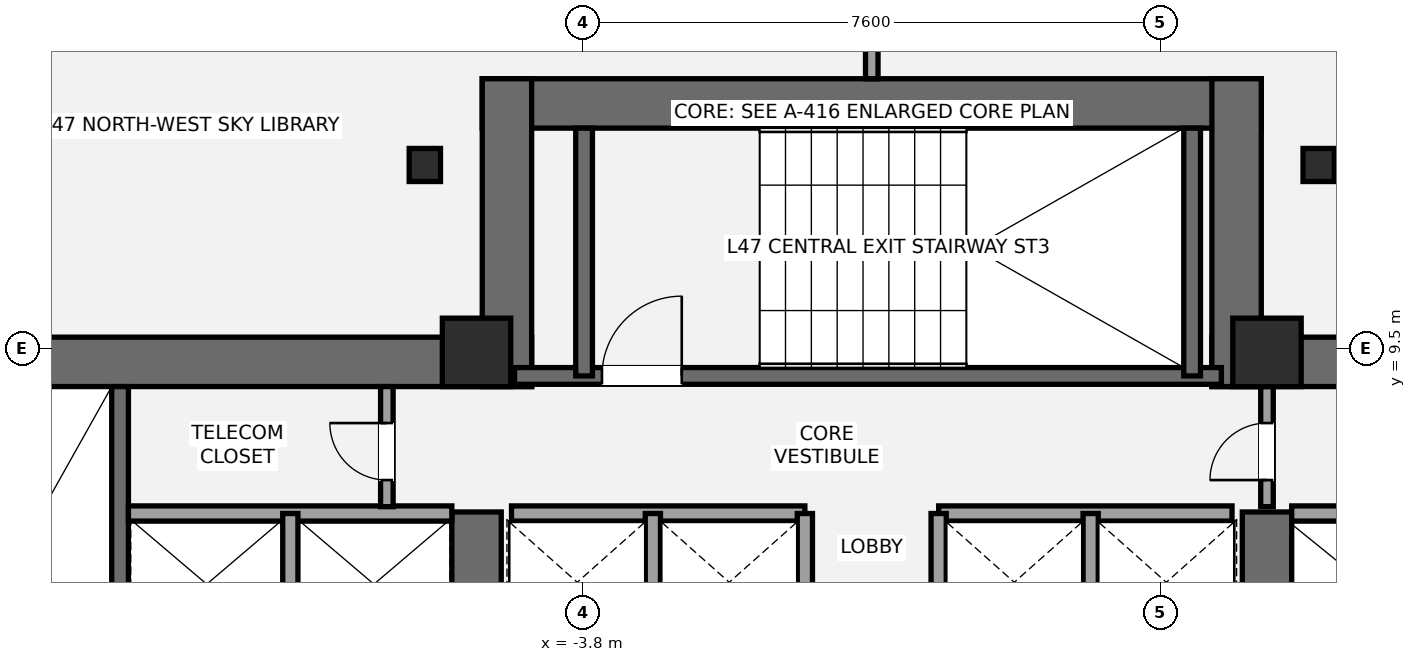
"""IFC4 building model, lengths in metres.
Left out: names, types, materials, properties, quantities, classifications, styles, units other than length and angle.
Written with IfcOpenShell. Run it as: python <this file> out.ifc"""

import sys

from ifc_helpers import new_model, si_unit, direction, frame, frame_2d, origin, origin_2d, place, context, subcontext, project, spatial, rectangle, i_section, extrude, element, fill, save


model = new_model("IFC4")
c1 = context("Model", 3, precision=1e-05, world=origin(), true_north=direction((0.0, 1.0)))
c2 = subcontext(c1, "Body", "Model", "MODEL_VIEW")
j1 = project(units=[si_unit("LENGTHUNIT", "METRE"), si_unit("PLANEANGLEUNIT", "RADIAN")], contexts=[c1])
p1 = place(None, origin())
s1 = spatial("IfcSite", under=j1, at=p1, CompositionType="ELEMENT")
p2 = place(p1, origin())
s2 = spatial("IfcBuilding", under=s1, at=p2, CompositionType="ELEMENT")
p3 = place(p2, frame((0.0, 0.0, 172.6)))
s3 = spatial("IfcBuildingStorey", under=s2, at=p3, CompositionType="ELEMENT", Elevation=172.6)
p4 = place(p3, frame((-13.8, 9.325, 0.0), z_axis=(0.0, 0.0, 1.0), x_axis=(1.0, 0.0, 0.0)))
e1 = element("IfcWall", 1, at=p4, inside=s3, PredefinedType="SHEAR", context=c2, shape_type="SweptSolid", body=[
    extrude(rectangle(XDim=9.325, YDim=0.65, at=frame_2d((4.663, 0.0))), origin(), (0.0, 0.0, 1.0), 3.2),
])
p5 = place(p3, frame((-5.2, 5.35, 0.0), z_axis=(0.0, 0.0, 1.0), x_axis=(0.0, 1.0, 0.0)))
e2 = element("IfcWall", 2, at=p5, inside=s3, PredefinedType="SHEAR", context=c2, shape_type="SweptSolid", body=[
    extrude(rectangle(XDim=2.0, YDim=0.65, at=frame_2d((1.0, 0.0))), origin(), (0.0, 0.0, 1.0), 3.2),
])
p6 = place(p3, frame((-9.89, 1.85, 0.0), z_axis=(0.0, 0.0, 1.0), x_axis=(0.0, 1.0, 0.0)))
e3 = element("IfcWall", 3, at=p6, inside=s3, PredefinedType="SHEAR", context=c2, shape_type="SweptSolid", body=[
    extrude(rectangle(XDim=7.15, YDim=0.22, at=frame_2d((3.575, 0.0))), origin(), (0.0, 0.0, 1.0), 3.2),
])
p7 = place(p3, frame((4.475, 9.325, 0.0), z_axis=(0.0, 0.0, 1.0), x_axis=(1.0, 0.0, 0.0)))
e4 = element("IfcWall", 4, at=p7, inside=s3, PredefinedType="SHEAR", context=c2, shape_type="SweptSolid", body=[
    extrude(rectangle(XDim=9.325, YDim=0.65, at=frame_2d((4.663, 0.0))), origin(), (0.0, 0.0, 1.0), 3.2),
])
p8 = place(p3, frame((5.2, 5.35, 0.0), z_axis=(0.0, 0.0, 1.0), x_axis=(0.0, 1.0, 0.0)))
e5 = element("IfcWall", 5, at=p8, inside=s3, PredefinedType="SHEAR", context=c2, shape_type="SweptSolid", body=[
    extrude(rectangle(XDim=2.0, YDim=0.65, at=frame_2d((1.0, 0.0))), origin(), (0.0, 0.0, 1.0), 3.2),
])
p9 = place(p3, frame((-5.125, 12.725, 0.0), z_axis=(0.0, 0.0, 1.0), x_axis=(1.0, 0.0, 0.0)))
e6 = element("IfcWall", 6, at=p9, inside=s3, PredefinedType="SHEAR", context=c2, shape_type="SweptSolid", body=[
    extrude(rectangle(XDim=10.25, YDim=0.65, at=frame_2d((5.125, 0.0))), origin(), (0.0, 0.0, 1.0), 3.2),
])
for number, where, z_axis, x_axis in (
    (7, (-4.8, 9.0, 0.0), (0.0, 0.0, 1.0), (0.0, 1.0, 0.0)),
    (8, (4.8, 9.0, 0.0), (0.0, 0.0, 1.0), (0.0, 1.0, 0.0)),
):
    element("IfcWall", number, at=place(p3, frame(where, z_axis=z_axis, x_axis=x_axis)), inside=s3, PredefinedType="SHEAR", context=c2, shape_type="SweptSolid", body=[
        extrude(rectangle(XDim=4.05, YDim=0.65, at=frame_2d((2.025, 0.0))), origin(), (0.0, 0.0, 1.0), 3.2),
    ])
p10 = place(p3, frame((-4.7, 9.14, 0.0), z_axis=(0.0, 0.0, 1.0), x_axis=(1.0, 0.0, 0.0)))
e9 = element("IfcWall", 9, at=p10, inside=s3, PredefinedType="SHEAR", context=c2, shape_type="SweptSolid", body=[
    extrude(rectangle(XDim=9.3, YDim=0.22, at=frame_2d((4.65, 0.0))), origin(), (0.0, 0.0, 1.0), 3.2),
])
p11 = place(p10, frame((1.15, 0.0, 0.0)))
e10 = element("IfcOpeningElement", 10, at=p11, cuts=e9, PredefinedType="OPENING", context=c2, shape_type="SweptSolid", body=[
    extrude(rectangle(XDim=1.05, YDim=2.15, at=frame_2d((0.525, 1.075))), frame((0.0, 0.12, 0.0), z_axis=(0.0, -1.0, 0.0), x_axis=(1.0, 0.0, 0.0)), (0.0, 0.0, 1.0), 0.24),
])
for number, where, z_axis, x_axis in (
    (11, (-3.785, 9.14, 0.0), (0.0, 0.0, 1.0), (0.0, 1.0, 0.0)),
    (12, (4.215, 9.14, 0.0), (0.0, 0.0, 1.0), (0.0, 1.0, 0.0)),
):
    element("IfcWall", number, at=place(p3, frame(where, z_axis=z_axis, x_axis=x_axis)), inside=s3, PredefinedType="SHEAR", context=c2, shape_type="SweptSolid", body=[
        extrude(rectangle(XDim=3.26, YDim=0.22, at=frame_2d((1.63, 0.0))), origin(), (0.0, 0.0, 1.0), 3.2),
    ])
for number, where, z_axis, x_axis in (
    (13, (-5.2, 9.45, 0.0), (0.0, 0.0, 1.0), (1.0, 0.0, 0.0)),
    (14, (5.2, 9.45, 0.0), (0.0, 0.0, 1.0), (1.0, 0.0, 0.0)),
):
    element("IfcColumn", number, at=place(p3, frame(where, z_axis=z_axis, x_axis=x_axis)), inside=s3, PredefinedType="COLUMN", context=c2, shape_type="SweptSolid", body=[
        extrude(rectangle(XDim=0.9, YDim=0.9, at=origin_2d()), origin(), (0.0, 0.0, 1.0), 3.2),
    ])
for number, where, z_axis, x_axis in (
    (15, (5.88, 11.915, 0.0), (0.0, 0.0, 1.0), (1.0, 0.0, 0.0)),
    (16, (-5.88, 11.915, 0.0), (0.0, 0.0, 1.0), (1.0, 0.0, 0.0)),
):
    element("IfcColumn", number, at=place(p3, frame(where, z_axis=z_axis, x_axis=x_axis)), inside=s3, PredefinedType="COLUMN", context=c2, shape_type="SweptSolid", body=[
        extrude(i_section(OverallWidth=0.412, OverallDepth=0.435, WebThickness=0.036, FlangeThickness=0.057, at=origin_2d()), origin(), (0.0, 0.0, 1.0), 3.2),
    ])
p12 = place(p3, frame((-9.78, 7.33, 0.0), z_axis=(0.0, 0.0, 1.0), x_axis=(1.0, 0.0, 0.0)))
e17 = element("IfcWall", 17, at=p12, inside=s3, PredefinedType="SOLIDWALL", context=c2, shape_type="SweptSolid", body=[
    extrude(rectangle(XDim=4.255, YDim=0.2, at=frame_2d((2.127, 0.0))), origin(), (0.0, 0.0, 1.0), 3.02),
])
p13 = place(p3, frame((-7.65, 5.47, 0.0), z_axis=(0.0, 0.0, 1.0), x_axis=(0.0, 1.0, 0.0)))
e18 = element("IfcWall", 18, at=p13, inside=s3, PredefinedType="SOLIDWALL", context=c2, shape_type="SweptSolid", body=[
    extrude(rectangle(XDim=1.86, YDim=0.2, at=frame_2d((0.93, 0.0))), origin(), (0.0, 0.0, 1.0), 3.02),
])
p14 = place(p3, frame((5.525, 7.33, 0.0), z_axis=(0.0, 0.0, 1.0), x_axis=(1.0, 0.0, 0.0)))
e19 = element("IfcWall", 19, at=p14, inside=s3, PredefinedType="SOLIDWALL", context=c2, shape_type="SweptSolid", body=[
    extrude(rectangle(XDim=4.255, YDim=0.2, at=frame_2d((2.127, 0.0))), origin(), (0.0, 0.0, 1.0), 3.02),
])
for number, where, z_axis, x_axis in (
    (20, (-4.74, 7.33, 0.0), (0.0, 0.0, 1.0), (1.0, 0.0, 0.0)),
    (21, (0.88, 7.33, 0.0), (0.0, 0.0, 1.0), (1.0, 0.0, 0.0)),
):
    element("IfcWall", number, at=place(p3, frame(where, z_axis=z_axis, x_axis=x_axis)), inside=s3, PredefinedType="SOLIDWALL", context=c2, shape_type="SweptSolid", body=[
        extrude(rectangle(XDim=3.86, YDim=0.2, at=frame_2d((1.93, 0.0))), origin(), (0.0, 0.0, 1.0), 3.02),
    ])
for number, where, z_axis, x_axis in (
    (22, (-2.88, 5.52, 0.0), (0.0, 0.0, 1.0), (0.0, 1.0, 0.0)),
    (23, (2.88, 5.52, 0.0), (0.0, 0.0, 1.0), (0.0, 1.0, 0.0)),
    (24, (-0.88, 5.52, 0.0), (0.0, 0.0, 1.0), (0.0, 1.0, 0.0)),
    (25, (0.88, 5.52, 0.0), (0.0, 0.0, 1.0), (0.0, 1.0, 0.0)),
):
    element("IfcWall", number, at=place(p3, frame(where, z_axis=z_axis, x_axis=x_axis)), inside=s3, PredefinedType="SOLIDWALL", context=c2, shape_type="SweptSolid", body=[
        extrude(rectangle(XDim=1.81, YDim=0.2, at=frame_2d((0.905, 0.0))), origin(), (0.0, 0.0, 1.0), 3.02),
    ])
p15 = place(p3, frame((-6.38, 7.42, 0.0), z_axis=(0.0, 0.0, 1.0), x_axis=(0.0, 1.0, 0.0)))
e26 = element("IfcWall", 26, at=p15, inside=s3, PredefinedType="PARTITIONING", context=c2, shape_type="SweptSolid", body=[
    extrude(rectangle(XDim=1.58, YDim=0.165, at=frame_2d((0.79, 0.0))), origin(), (0.0, 0.0, 1.0), 3.02),
])
p16 = place(p15, frame((0.35, 0.0, 0.0)))
e27 = element("IfcOpeningElement", 27, at=p16, cuts=e26, PredefinedType="OPENING", context=c2, shape_type="SweptSolid", body=[
    extrude(rectangle(XDim=0.75, YDim=2.1, at=frame_2d((0.375, 1.05))), frame((0.0, 0.093, 0.0), z_axis=(0.0, -1.0, 0.0), x_axis=(1.0, 0.0, 0.0)), (0.0, 0.0, 1.0), 0.185),
])
p17 = place(p3, frame((5.2, 7.42, 0.0), z_axis=(0.0, 0.0, 1.0), x_axis=(0.0, 1.0, 0.0)))
e28 = element("IfcWall", 28, at=p17, inside=s3, PredefinedType="PARTITIONING", context=c2, shape_type="SweptSolid", body=[
    extrude(rectangle(XDim=1.58, YDim=0.165, at=frame_2d((0.79, 0.0))), origin(), (0.0, 0.0, 1.0), 3.02),
])
p18 = place(p17, frame((0.35, 0.0, 0.0)))
e29 = element("IfcOpeningElement", 29, at=p18, cuts=e28, PredefinedType="OPENING", context=c2, shape_type="SweptSolid", body=[
    extrude(rectangle(XDim=0.75, YDim=2.1, at=frame_2d((0.375, 1.05))), frame((0.0, 0.093, 0.0), z_axis=(0.0, -1.0, 0.0), x_axis=(1.0, 0.0, 0.0)), (0.0, 0.0, 1.0), 0.185),
])
p19 = place(p3, frame((0.0, 13.05, 0.0), z_axis=(0.0, 0.0, 1.0), x_axis=(0.0, 1.0, 0.0)))
e30 = element("IfcWall", 30, at=p19, inside=s3, PredefinedType="PARTITIONING", context=c2, shape_type="SweptSolid", body=[
    extrude(rectangle(XDim=3.336, YDim=0.165, at=frame_2d((1.668, 0.0))), origin(), (0.0, 0.0, 1.0), 3.02),
])
p20 = place(p11, origin())
e31 = element("IfcDoor", 31, at=p20, inside=s3, OperationType="SINGLE_SWING_RIGHT", PredefinedType="DOOR", context=c2, shape_type="SweptSolid", body=[
    extrude(rectangle(XDim=1.05, YDim=2.15, at=frame_2d((0.525, 1.075))), frame((0.0, 0.025, 0.0), z_axis=(0.0, -1.0, 0.0), x_axis=(1.0, 0.0, 0.0)), (0.0, 0.0, 1.0), 0.05),
])
fill(e10, e31)
p21 = place(p16, origin())
e32 = element("IfcDoor", 32, at=p21, inside=s3, OperationType="SINGLE_SWING_RIGHT", PredefinedType="DOOR", context=c2, shape_type="SweptSolid", body=[
    extrude(rectangle(XDim=0.75, YDim=2.1, at=frame_2d((0.375, 1.05))), frame((0.0, 0.025, 0.0), z_axis=(0.0, -1.0, 0.0), x_axis=(1.0, 0.0, 0.0)), (0.0, 0.0, 1.0), 0.05),
])
fill(e27, e32)
p22 = place(p18, origin())
e33 = element("IfcDoor", 33, at=p22, inside=s3, OperationType="SINGLE_SWING_LEFT", PredefinedType="DOOR", context=c2, shape_type="SweptSolid", body=[
    extrude(rectangle(XDim=0.75, YDim=2.1, at=frame_2d((0.375, 1.05))), frame((0.0, 0.025, 0.0), z_axis=(0.0, -1.0, 0.0), x_axis=(1.0, 0.0, 0.0)), (0.0, 0.0, 1.0), 0.05),
])
fill(e29, e33)
save(model, sys.argv[1])
